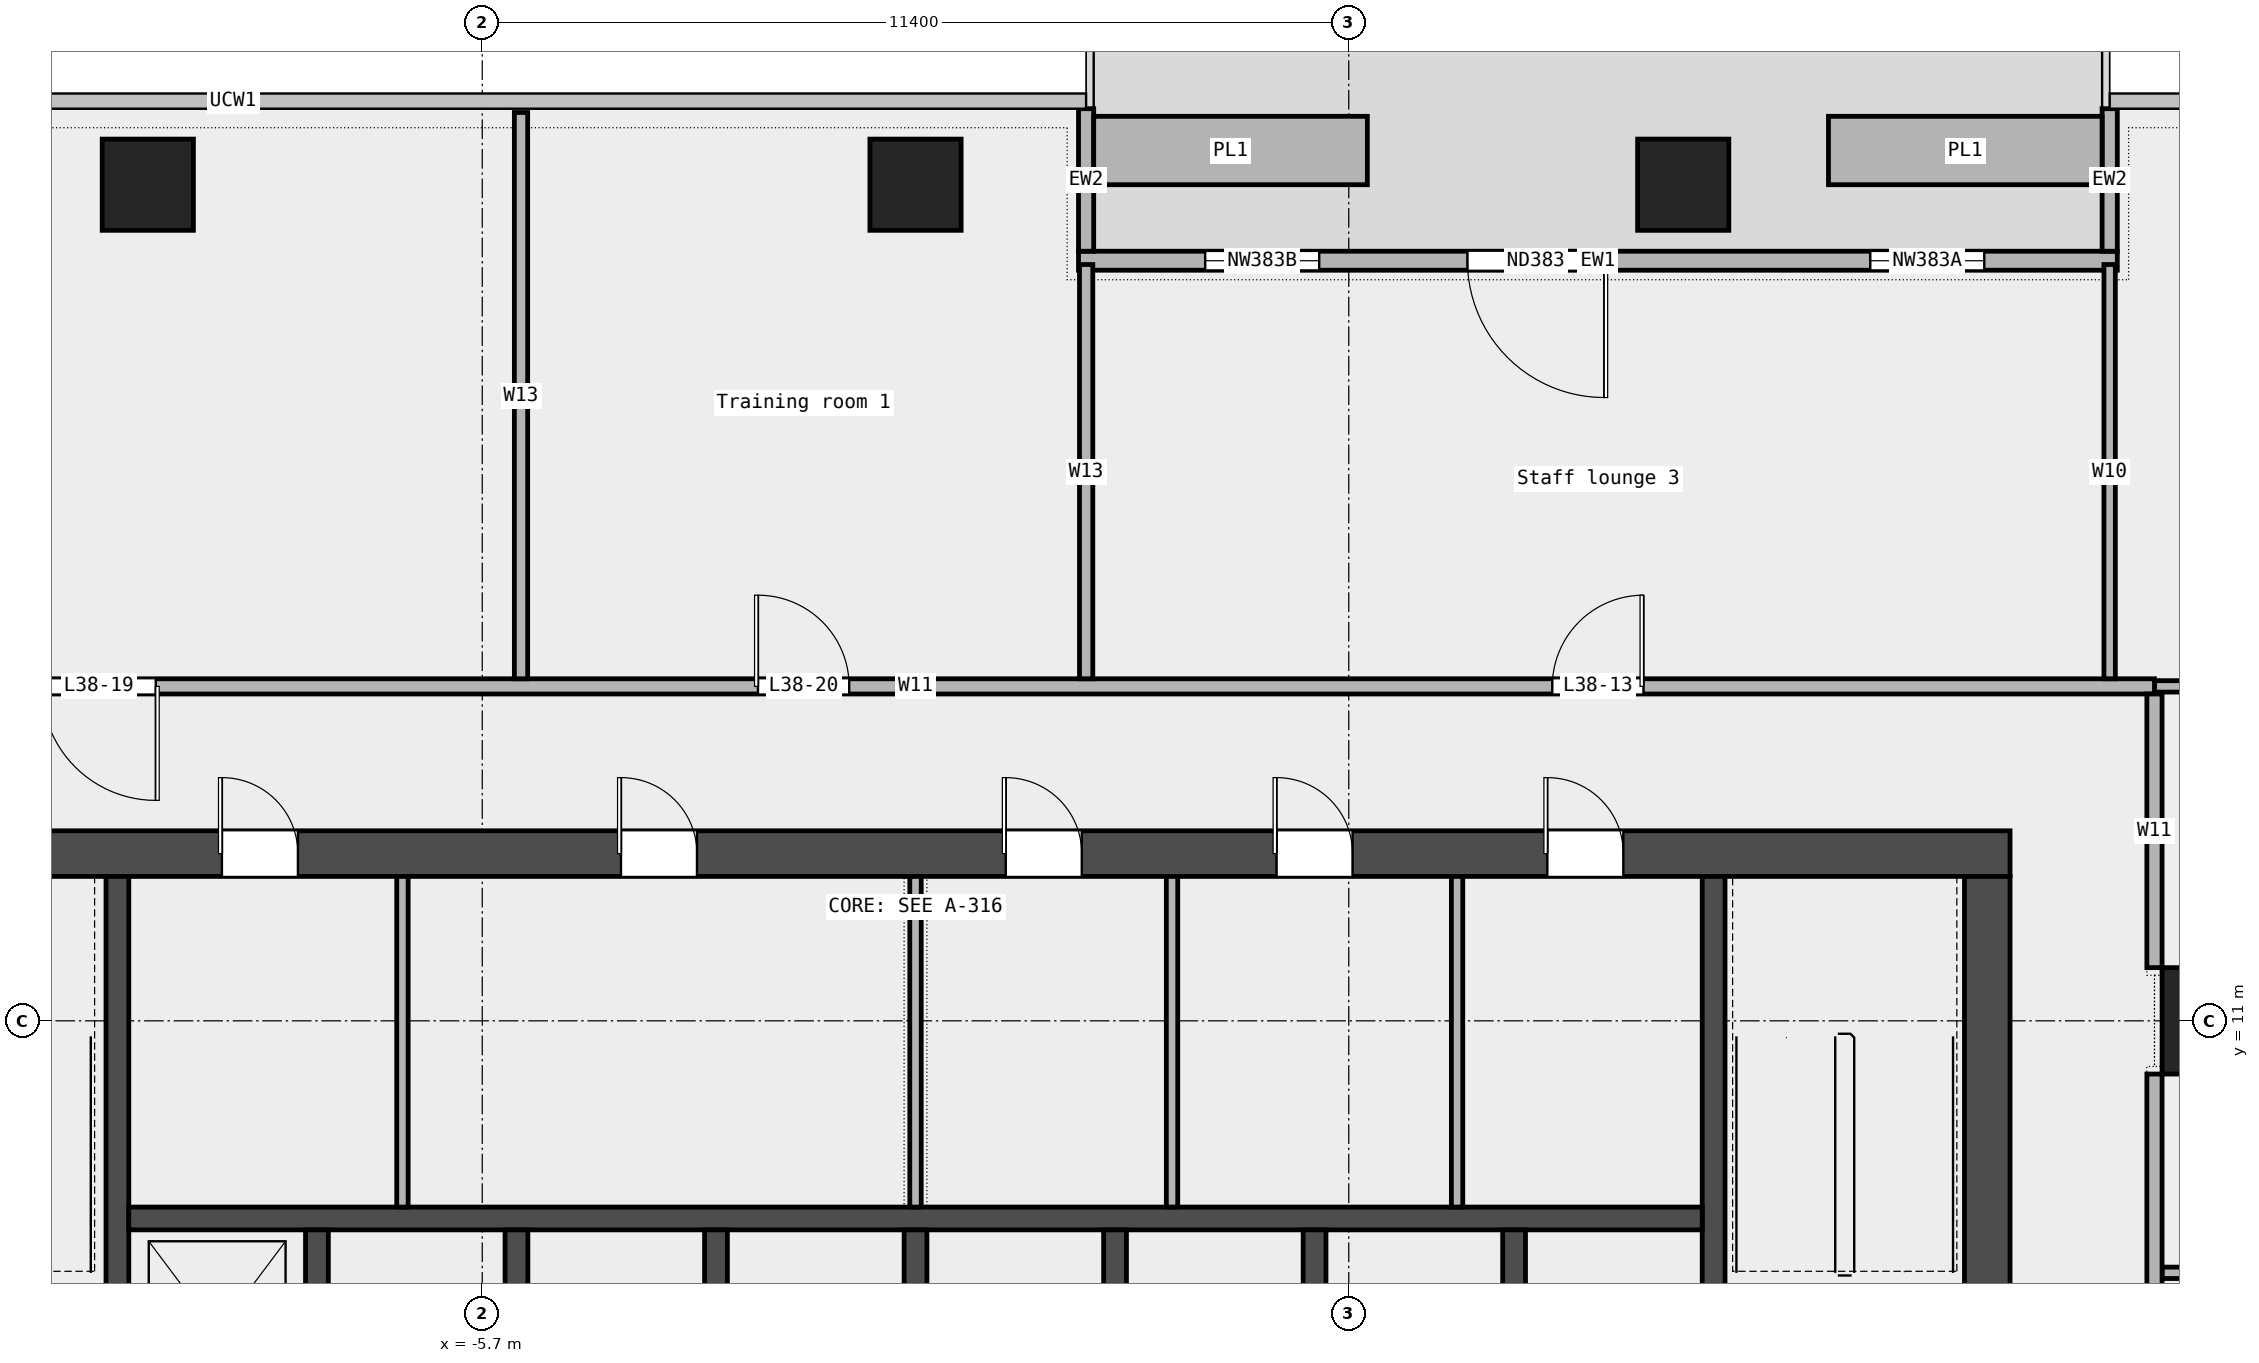
"""IFC4 building model, lengths in metres.
Left out: names, types, materials, properties, quantities, classifications, styles, units other than length and angle.
Written with IfcOpenShell. Run it as: python <this file> out.ifc"""

import sys

from ifc_helpers import new_model, si_unit, direction, frame, frame_2d, origin, origin_2d, place, context, subcontext, project, spatial, rectangle, extrude, element, fill, save


model = new_model("IFC4")
c1 = context("Model", 3, precision=1e-05, world=origin(), true_north=direction((0.0, 1.0)))
c2 = subcontext(c1, "Body", "Model", "MODEL_VIEW")
j1 = project(units=[si_unit("LENGTHUNIT", "METRE"), si_unit("PLANEANGLEUNIT", "RADIAN")], contexts=[c1])
p1 = place(None, origin())
s1 = spatial("IfcSite", under=j1, at=p1, CompositionType="ELEMENT")
p2 = place(p1, origin())
s2 = spatial("IfcBuilding", under=s1, at=p2, CompositionType="ELEMENT")
p3 = place(p2, frame((0.0, 0.0, 185.0)))
s3 = spatial("IfcBuildingStorey", under=s2, at=p3, CompositionType="ELEMENT", Elevation=185.0)
for number, where, z_axis, x_axis in (
    (1, (10.1, 22.0, 0.0), (0.0, 0.0, 1.0), (1.0, 0.0, 0.0)),
    (2, (0.0, 22.0, 0.0), (0.0, 0.0, 1.0), (1.0, 0.0, 0.0)),
    (3, (-10.1, 22.0, 0.0), (0.0, 0.0, 1.0), (1.0, 0.0, 0.0)),
):
    element("IfcColumn", number, at=place(p3, frame(where, z_axis=z_axis, x_axis=x_axis)), inside=s3, PredefinedType="COLUMN", context=c2, shape_type="SweptSolid", body=[
        extrude(rectangle(XDim=1.2, YDim=1.2, at=origin_2d()), origin(), (0.0, 0.0, 1.0), 3.6),
    ])
p4 = place(p3, frame((17.1, 11.0, 0.0), z_axis=(0.0, 0.0, 1.0), x_axis=(1.0, 0.0, 0.0)))
e4 = element("IfcColumn", 4, at=p4, inside=s3, PredefinedType="COLUMN", context=c2, shape_type="SweptSolid", body=[
    extrude(rectangle(XDim=1.4, YDim=1.4, at=origin_2d()), origin(), (0.0, 0.0, 1.0), 3.6),
])
p5 = place(p3, frame((15.811, 21.0, 0.0), z_axis=(0.0, 0.0, 1.0), x_axis=(-1.0, 0.0, 0.0)))
e5 = element("IfcWall", 5, at=p5, inside=s3, PredefinedType="STANDARD", context=c2, shape_type="SweptSolid", body=[
    extrude(rectangle(XDim=13.667, YDim=0.25, at=frame_2d((6.833, 0.0))), origin(), (0.0, 0.0, 1.0), 3.6),
])
p6 = place(p5, frame((1.75, 0.0, 0.45)))
e6 = element("IfcOpeningElement", 6, at=p6, cuts=e5, PredefinedType="OPENING", context=c2, shape_type="SweptSolid", body=[
    extrude(rectangle(XDim=1.5, YDim=2.4, at=frame_2d((0.75, 1.2))), frame((0.0, 0.137, 0.0), z_axis=(0.0, -1.0, 0.0), x_axis=(1.0, 0.0, 0.0)), (0.0, 0.0, 1.0), 0.274),
])
p7 = place(p5, frame((6.75, 0.0, 0.0)))
e7 = element("IfcOpeningElement", 7, at=p7, cuts=e5, PredefinedType="OPENING", context=c2, shape_type="SweptSolid", body=[
    extrude(rectangle(XDim=1.8, YDim=2.4, at=frame_2d((0.9, 1.2))), frame((0.0, 0.137, 0.0), z_axis=(0.0, -1.0, 0.0), x_axis=(1.0, 0.0, 0.0)), (0.0, 0.0, 1.0), 0.274),
])
p8 = place(p5, frame((10.5, 0.0, 0.45)))
e8 = element("IfcOpeningElement", 8, at=p8, cuts=e5, PredefinedType="OPENING", context=c2, shape_type="SweptSolid", body=[
    extrude(rectangle(XDim=1.5, YDim=2.4, at=frame_2d((0.75, 1.2))), frame((0.0, 0.137, 0.0), z_axis=(0.0, -1.0, 0.0), x_axis=(1.0, 0.0, 0.0)), (0.0, 0.0, 1.0), 0.274),
])
for number, where, z_axis, x_axis in (
    (9, (15.711, 23.0, 0.0), (0.0, 0.0, 1.0), (0.0, -1.0, 0.0)),
    (10, (2.244, 23.0, 0.0), (0.0, 0.0, 1.0), (0.0, -1.0, 0.0)),
):
    element("IfcWall", number, at=place(p3, frame(where, z_axis=z_axis, x_axis=x_axis)), inside=s3, PredefinedType="STANDARD", context=c2, shape_type="SweptSolid", body=[
        extrude(rectangle(XDim=1.875, YDim=0.2, at=frame_2d((0.938, 0.0))), origin(), (0.0, 0.0, 1.0), 3.6),
    ])
for number, where, z_axis, x_axis in (
    (11, (15.611, 22.45, 0.0), (0.0, 0.0, 1.0), (-1.0, 0.0, 0.0)),
    (12, (5.944, 22.45, 0.0), (0.0, 0.0, 1.0), (-1.0, 0.0, 0.0)),
):
    element("IfcWall", number, at=place(p3, frame(where, z_axis=z_axis, x_axis=x_axis)), inside=s3, PredefinedType="STANDARD", context=c2, shape_type="SweptSolid", body=[
        extrude(rectangle(XDim=3.6, YDim=0.9, at=frame_2d((1.8, 0.0))), origin(), (0.0, 0.0, 1.0), 0.7),
    ])
p9 = place(p3, frame((16.4, 7.685, 0.0), z_axis=(0.0, 0.0, 1.0), x_axis=(1.0, 0.0, 0.0)))
e13 = element("IfcWall", 13, at=p9, inside=s3, PredefinedType="PARTITIONING", context=c2, shape_type="SweptSolid", body=[
    extrude(rectangle(XDim=3.4, YDim=0.15, at=frame_2d((1.7, 0.0))), origin(), (0.0, 0.0, 1.0), 3.6),
])
p10 = place(p3, frame((16.3, 15.4, 0.0), z_axis=(0.0, 0.0, 1.0), x_axis=(1.0, 0.0, 0.0)))
e14 = element("IfcWall", 14, at=p10, inside=s3, PredefinedType="PARTITIONING", context=c2, shape_type="SweptSolid", body=[
    extrude(rectangle(XDim=3.6, YDim=0.15, at=frame_2d((1.8, 0.0))), origin(), (0.0, 0.0, 1.0), 3.6),
])
p11 = place(p3, frame((-16.3, 15.4, 0.0), z_axis=(0.0, 0.0, 1.0), x_axis=(1.0, 0.0, 0.0)))
e15 = element("IfcWall", 15, at=p11, inside=s3, PredefinedType="PARTITIONING", context=c2, shape_type="SweptSolid", body=[
    extrude(rectangle(XDim=32.6, YDim=0.2, at=frame_2d((16.3, 0.0))), origin(), (0.0, 0.0, 1.0), 3.6),
])
p12 = place(p11, frame((24.677, 0.0, 0.0)))
e16 = element("IfcOpeningElement", 16, at=p12, cuts=e15, PredefinedType="OPENING", context=c2, shape_type="SweptSolid", body=[
    extrude(rectangle(XDim=1.2, YDim=2.1, at=frame_2d((0.6, 1.05))), frame((0.0, 0.112, 0.0), z_axis=(0.0, -1.0, 0.0), x_axis=(1.0, 0.0, 0.0)), (0.0, 0.0, 1.0), 0.224),
])
p13 = place(p11, frame((4.805, 0.0, 0.0)))
e17 = element("IfcOpeningElement", 17, at=p13, cuts=e15, PredefinedType="OPENING", context=c2, shape_type="SweptSolid", body=[
    extrude(rectangle(XDim=1.5, YDim=2.1, at=frame_2d((0.75, 1.05))), frame((0.0, 0.112, 0.0), z_axis=(0.0, -1.0, 0.0), x_axis=(1.0, 0.0, 0.0)), (0.0, 0.0, 1.0), 0.224),
])
p14 = place(p11, frame((14.228, 0.0, 0.0)))
e18 = element("IfcOpeningElement", 18, at=p14, cuts=e15, PredefinedType="OPENING", context=c2, shape_type="SweptSolid", body=[
    extrude(rectangle(XDim=1.2, YDim=2.1, at=frame_2d((0.6, 1.05))), frame((0.0, 0.112, 0.0), z_axis=(0.0, -1.0, 0.0), x_axis=(1.0, 0.0, 0.0)), (0.0, 0.0, 1.0), 0.224),
])
p15 = place(p3, frame((-5.19, 15.5, 0.0), z_axis=(0.0, 0.0, 1.0), x_axis=(0.0, 1.0, 0.0)))
e19 = element("IfcWall", 19, at=p15, inside=s3, PredefinedType="PARTITIONING", context=c2, shape_type="SweptSolid", body=[
    extrude(rectangle(XDim=7.45, YDim=0.175, at=frame_2d((3.725, 0.0))), origin(), (0.0, 0.0, 1.0), 3.6),
])
p16 = place(p3, frame((2.245, 15.5, 0.0), z_axis=(0.0, 0.0, 1.0), x_axis=(0.0, 1.0, 0.0)))
e20 = element("IfcWall", 20, at=p16, inside=s3, PredefinedType="PARTITIONING", context=c2, shape_type="SweptSolid", body=[
    extrude(rectangle(XDim=5.45, YDim=0.175, at=frame_2d((2.725, 0.0))), origin(), (0.0, 0.0, 1.0), 3.6),
])
p17 = place(p3, frame((15.71, 15.5, 0.0), z_axis=(0.0, 0.0, 1.0), x_axis=(0.0, 1.0, 0.0)))
e21 = element("IfcWall", 21, at=p17, inside=s3, PredefinedType="PARTITIONING", context=c2, shape_type="SweptSolid", body=[
    extrude(rectangle(XDim=5.45, YDim=0.15, at=frame_2d((2.725, 0.0))), origin(), (0.0, 0.0, 1.0), 3.6),
])
p18 = place(p3, frame((16.3, 2.95, 0.0), z_axis=(0.0, 0.0, 1.0), x_axis=(0.0, 1.0, 0.0)))
e22 = element("IfcWall", 22, at=p18, inside=s3, PredefinedType="PARTITIONING", context=c2, shape_type="SweptSolid", body=[
    extrude(rectangle(XDim=7.35, YDim=0.2, at=frame_2d((3.675, 0.0))), origin(), (0.0, 0.0, 1.0), 3.6),
])
p19 = place(p3, frame((16.3, 11.7, 0.0), z_axis=(0.0, 0.0, 1.0), x_axis=(0.0, 1.0, 0.0)))
e23 = element("IfcWall", 23, at=p19, inside=s3, PredefinedType="PARTITIONING", context=c2, shape_type="SweptSolid", body=[
    extrude(rectangle(XDim=3.6, YDim=0.2, at=frame_2d((1.8, 0.0))), origin(), (0.0, 0.0, 1.0), 3.6),
])
p20 = place(p3, frame((-14.4, 13.2, 0.0), z_axis=(0.0, 0.0, 1.0), x_axis=(1.0, 0.0, 0.0)))
e24 = element("IfcWall", 24, at=p20, inside=s3, PredefinedType="SHEAR", context=c2, shape_type="SweptSolid", body=[
    extrude(rectangle(XDim=28.8, YDim=0.6, at=frame_2d((14.4, 0.0))), origin(), (0.0, 0.0, 1.0), 3.7),
])
p21 = place(p20, frame((5.275, 0.0, 0.0)))
e25 = element("IfcOpeningElement", 25, at=p21, cuts=e24, PredefinedType="OPENING", context=c2, shape_type="SweptSolid", body=[
    extrude(rectangle(XDim=1.0, YDim=2.1, at=frame_2d((0.5, 1.05))), frame((0.0, 0.312, 0.0), z_axis=(0.0, -1.0, 0.0), x_axis=(1.0, 0.0, 0.0)), (0.0, 0.0, 1.0), 0.624),
])
p22 = place(p20, frame((10.525, 0.0, 0.0)))
e26 = element("IfcOpeningElement", 26, at=p22, cuts=e24, PredefinedType="OPENING", context=c2, shape_type="SweptSolid", body=[
    extrude(rectangle(XDim=1.0, YDim=2.1, at=frame_2d((0.5, 1.05))), frame((0.0, 0.312, 0.0), z_axis=(0.0, -1.0, 0.0), x_axis=(1.0, 0.0, 0.0)), (0.0, 0.0, 1.0), 0.624),
])
p23 = place(p20, frame((15.587, 0.0, 0.0)))
e27 = element("IfcOpeningElement", 27, at=p23, cuts=e24, PredefinedType="OPENING", context=c2, shape_type="SweptSolid", body=[
    extrude(rectangle(XDim=1.0, YDim=2.1, at=frame_2d((0.5, 1.05))), frame((0.0, 0.312, 0.0), z_axis=(0.0, -1.0, 0.0), x_axis=(1.0, 0.0, 0.0)), (0.0, 0.0, 1.0), 0.624),
])
p24 = place(p20, frame((19.15, 0.0, 0.0)))
e28 = element("IfcOpeningElement", 28, at=p24, cuts=e24, PredefinedType="OPENING", context=c2, shape_type="SweptSolid", body=[
    extrude(rectangle(XDim=1.0, YDim=2.1, at=frame_2d((0.5, 1.05))), frame((0.0, 0.312, 0.0), z_axis=(0.0, -1.0, 0.0), x_axis=(1.0, 0.0, 0.0)), (0.0, 0.0, 1.0), 0.624),
])
p25 = place(p20, frame((22.712, 0.0, 0.0)))
e29 = element("IfcOpeningElement", 29, at=p25, cuts=e24, PredefinedType="OPENING", context=c2, shape_type="SweptSolid", body=[
    extrude(rectangle(XDim=1.0, YDim=2.1, at=frame_2d((0.5, 1.05))), frame((0.0, 0.312, 0.0), z_axis=(0.0, -1.0, 0.0), x_axis=(1.0, 0.0, 0.0)), (0.0, 0.0, 1.0), 0.624),
])
p26 = place(p3, frame((14.1, -6.6, 0.0), z_axis=(0.0, 0.0, 1.0), x_axis=(0.0, 1.0, 0.0)))
e30 = element("IfcWall", 30, at=p26, inside=s3, PredefinedType="SHEAR", context=c2, shape_type="SweptSolid", body=[
    extrude(rectangle(XDim=19.5, YDim=0.6, at=frame_2d((9.75, 0.0))), origin(), (0.0, 0.0, 1.0), 3.7),
])
p27 = place(p26, frame((9.3, 0.0, 0.0)))
e31 = element("IfcOpeningElement", 31, at=p27, cuts=e30, PredefinedType="OPENING", context=c2, shape_type="SweptSolid", body=[
    extrude(rectangle(XDim=1.8, YDim=2.1, at=frame_2d((0.9, 1.05))), frame((0.0, 0.312, 0.0), z_axis=(0.0, -1.0, 0.0), x_axis=(1.0, 0.0, 0.0)), (0.0, 0.0, 1.0), 0.624),
])
for number, where, z_axis, x_axis in (
    (32, (-10.5, 5.25, 0.0), (0.0, 0.0, 1.0), (0.0, 1.0, 0.0)),
    (33, (10.5, 5.25, 0.0), (0.0, 0.0, 1.0), (0.0, 1.0, 0.0)),
):
    element("IfcWall", number, at=place(p3, frame(where, z_axis=z_axis, x_axis=x_axis)), inside=s3, PredefinedType="SHEAR", context=c2, shape_type="SweptSolid", body=[
        extrude(rectangle(XDim=7.65, YDim=0.3, at=frame_2d((3.825, 0.0))), origin(), (0.0, 0.0, 1.0), 3.7),
    ])
p28 = place(p3, frame((-10.35, 8.4, 0.0), z_axis=(0.0, 0.0, 1.0), x_axis=(1.0, 0.0, 0.0)))
e34 = element("IfcWall", 34, at=p28, inside=s3, PredefinedType="SOLIDWALL", context=c2, shape_type="SweptSolid", body=[
    extrude(rectangle(XDim=20.7, YDim=0.3, at=frame_2d((10.35, 0.0))), origin(), (0.0, 0.0, 1.0), 3.7),
])
for number, where, z_axis, x_axis in (
    (35, (-7.875, 5.55, 0.0), (0.0, 0.0, 1.0), (0.0, 1.0, 0.0)),
    (36, (-5.25, 5.55, 0.0), (0.0, 0.0, 1.0), (0.0, 1.0, 0.0)),
    (37, (-2.625, 5.55, 0.0), (0.0, 0.0, 1.0), (0.0, 1.0, 0.0)),
    (38, (0.0, 5.55, 0.0), (0.0, 0.0, 1.0), (0.0, 1.0, 0.0)),
    (39, (2.625, 5.55, 0.0), (0.0, 0.0, 1.0), (0.0, 1.0, 0.0)),
    (40, (5.25, 5.55, 0.0), (0.0, 0.0, 1.0), (0.0, 1.0, 0.0)),
    (41, (7.875, 5.55, 0.0), (0.0, 0.0, 1.0), (0.0, 1.0, 0.0)),
):
    element("IfcWall", number, at=place(p3, frame(where, z_axis=z_axis, x_axis=x_axis)), inside=s3, PredefinedType="SOLIDWALL", context=c2, shape_type="SweptSolid", body=[
        extrude(rectangle(XDim=2.7, YDim=0.3, at=frame_2d((1.35, 0.0))), origin(), (0.0, 0.0, 1.0), 3.7),
    ])
for number, where, z_axis, x_axis in (
    (42, (-6.75, 8.55, 0.0), (0.0, 0.0, 1.0), (0.0, 1.0, 0.0)),
    (43, (0.0, 8.55, 0.0), (0.0, 0.0, 1.0), (0.0, 1.0, 0.0)),
    (44, (3.375, 8.55, 0.0), (0.0, 0.0, 1.0), (0.0, 1.0, 0.0)),
    (45, (7.125, 8.55, 0.0), (0.0, 0.0, 1.0), (0.0, 1.0, 0.0)),
):
    element("IfcWall", number, at=place(p3, frame(where, z_axis=z_axis, x_axis=x_axis)), inside=s3, PredefinedType="PARTITIONING", context=c2, shape_type="SweptSolid", body=[
        extrude(rectangle(XDim=4.35, YDim=0.15, at=frame_2d((2.175, 0.0))), origin(), (0.0, 0.0, 1.0), 3.7),
    ])
p29 = place(p6, origin())
e46 = element("IfcWindow", 46, at=p29, inside=s3, PartitioningType="SINGLE_PANEL", PredefinedType="WINDOW", context=c2, shape_type="SweptSolid", body=[
    extrude(rectangle(XDim=1.5, YDim=2.4, at=frame_2d((0.75, 1.2))), frame((0.0, 0.03, 0.0), z_axis=(0.0, -1.0, 0.0), x_axis=(1.0, 0.0, 0.0)), (0.0, 0.0, 1.0), 0.06),
])
fill(e6, e46)
p30 = place(p7, origin())
e47 = element("IfcDoor", 47, at=p30, inside=s3, OperationType="DOUBLE_DOOR_SINGLE_SWING", PredefinedType="DOOR", context=c2, shape_type="SweptSolid", body=[
    extrude(rectangle(XDim=1.8, YDim=2.4, at=frame_2d((0.9, 1.2))), frame((0.0, 0.025, 0.0), z_axis=(0.0, -1.0, 0.0), x_axis=(1.0, 0.0, 0.0)), (0.0, 0.0, 1.0), 0.05),
])
fill(e7, e47)
p31 = place(p8, origin())
e48 = element("IfcWindow", 48, at=p31, inside=s3, PartitioningType="SINGLE_PANEL", PredefinedType="WINDOW", context=c2, shape_type="SweptSolid", body=[
    extrude(rectangle(XDim=1.5, YDim=2.4, at=frame_2d((0.75, 1.2))), frame((0.0, 0.03, 0.0), z_axis=(0.0, -1.0, 0.0), x_axis=(1.0, 0.0, 0.0)), (0.0, 0.0, 1.0), 0.06),
])
fill(e8, e48)
p32 = place(p12, origin())
e49 = element("IfcDoor", 49, at=p32, inside=s3, OperationType="SINGLE_SWING_RIGHT", PredefinedType="DOOR", context=c2, shape_type="SweptSolid", body=[
    extrude(rectangle(XDim=1.2, YDim=2.1, at=frame_2d((0.6, 1.05))), frame((0.0, 0.025, 0.0), z_axis=(0.0, -1.0, 0.0), x_axis=(1.0, 0.0, 0.0)), (0.0, 0.0, 1.0), 0.05),
])
fill(e16, e49)
p33 = place(p13, origin())
e50 = element("IfcDoor", 50, at=p33, inside=s3, OperationType="DOUBLE_DOOR_SINGLE_SWING", PredefinedType="DOOR", context=c2, shape_type="SweptSolid", body=[
    extrude(rectangle(XDim=1.5, YDim=2.1, at=frame_2d((0.75, 1.05))), frame((0.0, 0.025, 0.0), z_axis=(0.0, -1.0, 0.0), x_axis=(1.0, 0.0, 0.0)), (0.0, 0.0, 1.0), 0.05),
])
fill(e17, e50)
p34 = place(p14, origin())
e51 = element("IfcDoor", 51, at=p34, inside=s3, OperationType="SINGLE_SWING_LEFT", PredefinedType="DOOR", context=c2, shape_type="SweptSolid", body=[
    extrude(rectangle(XDim=1.2, YDim=2.1, at=frame_2d((0.6, 1.05))), frame((0.0, 0.025, 0.0), z_axis=(0.0, -1.0, 0.0), x_axis=(1.0, 0.0, 0.0)), (0.0, 0.0, 1.0), 0.05),
])
fill(e18, e51)
p35 = place(p21, origin())
e52 = element("IfcDoor", 52, at=p35, inside=s3, OperationType="SINGLE_SWING_LEFT", PredefinedType="DOOR", context=c2, shape_type="SweptSolid", body=[
    extrude(rectangle(XDim=1.0, YDim=2.1, at=frame_2d((0.5, 1.05))), frame((0.0, 0.025, 0.0), z_axis=(0.0, -1.0, 0.0), x_axis=(1.0, 0.0, 0.0)), (0.0, 0.0, 1.0), 0.05),
])
fill(e25, e52)
p36 = place(p22, origin())
e53 = element("IfcDoor", 53, at=p36, inside=s3, OperationType="SINGLE_SWING_LEFT", PredefinedType="DOOR", context=c2, shape_type="SweptSolid", body=[
    extrude(rectangle(XDim=1.0, YDim=2.1, at=frame_2d((0.5, 1.05))), frame((0.0, 0.025, 0.0), z_axis=(0.0, -1.0, 0.0), x_axis=(1.0, 0.0, 0.0)), (0.0, 0.0, 1.0), 0.05),
])
fill(e26, e53)
p37 = place(p23, origin())
e54 = element("IfcDoor", 54, at=p37, inside=s3, OperationType="SINGLE_SWING_LEFT", PredefinedType="DOOR", context=c2, shape_type="SweptSolid", body=[
    extrude(rectangle(XDim=1.0, YDim=2.1, at=frame_2d((0.5, 1.05))), frame((0.0, 0.025, 0.0), z_axis=(0.0, -1.0, 0.0), x_axis=(1.0, 0.0, 0.0)), (0.0, 0.0, 1.0), 0.05),
])
fill(e27, e54)
p38 = place(p24, origin())
e55 = element("IfcDoor", 55, at=p38, inside=s3, OperationType="SINGLE_SWING_LEFT", PredefinedType="DOOR", context=c2, shape_type="SweptSolid", body=[
    extrude(rectangle(XDim=1.0, YDim=2.1, at=frame_2d((0.5, 1.05))), frame((0.0, 0.025, 0.0), z_axis=(0.0, -1.0, 0.0), x_axis=(1.0, 0.0, 0.0)), (0.0, 0.0, 1.0), 0.05),
])
fill(e28, e55)
p39 = place(p25, origin())
e56 = element("IfcDoor", 56, at=p39, inside=s3, OperationType="SINGLE_SWING_LEFT", PredefinedType="DOOR", context=c2, shape_type="SweptSolid", body=[
    extrude(rectangle(XDim=1.0, YDim=2.1, at=frame_2d((0.5, 1.05))), frame((0.0, 0.025, 0.0), z_axis=(0.0, -1.0, 0.0), x_axis=(1.0, 0.0, 0.0)), (0.0, 0.0, 1.0), 0.05),
])
fill(e29, e56)
save(model, sys.argv[1])
